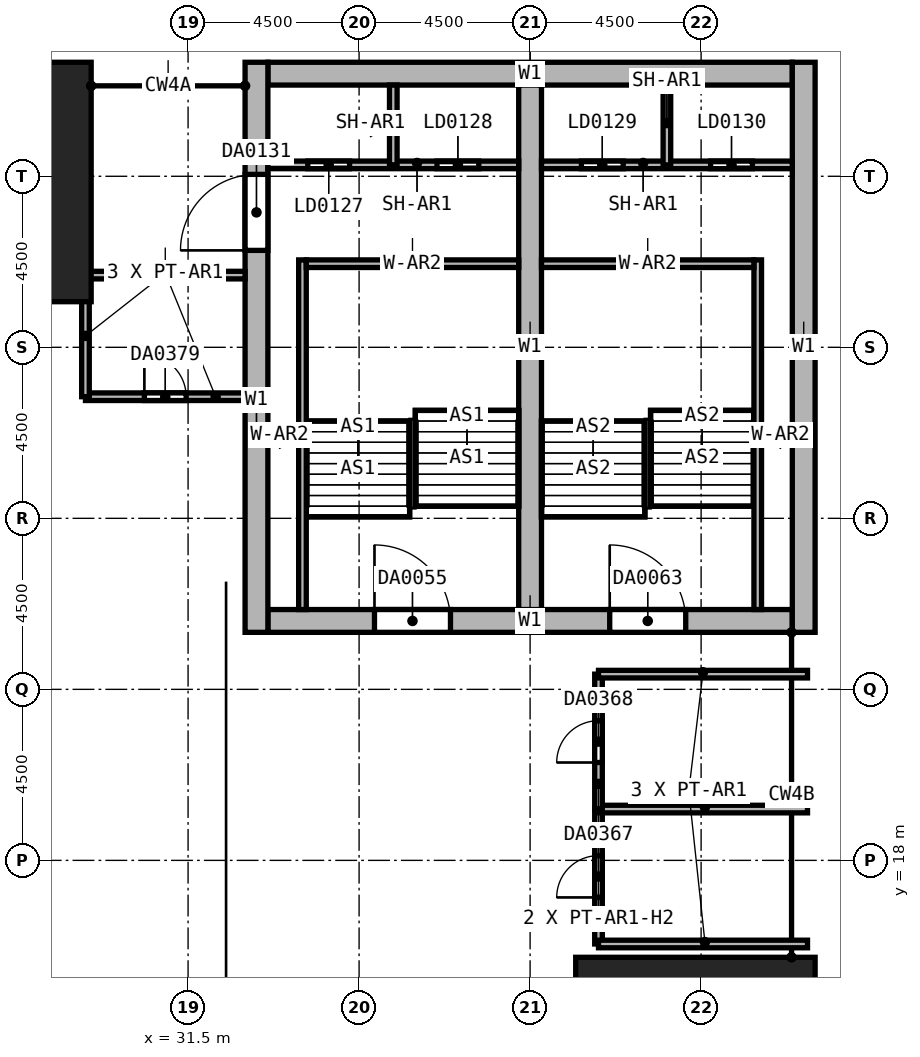
"""IFC4 building model, lengths in metres.
Left out: names, types, materials, properties, quantities, classifications, styles, units other than length and angle.
Written with IfcOpenShell. Run it as: python <this file> out.ifc"""

import sys

from ifc_helpers import new_model, si_unit, direction, frame, frame_2d, origin, origin_2d, place, context, subcontext, project, spatial, rectangle, extrude, element, fill, save


model = new_model("IFC4")
c1 = context("Model", 3, precision=1e-05, world=origin(), true_north=direction((0.0, 1.0)))
c2 = subcontext(c1, "Body", "Model", "MODEL_VIEW")
j1 = project(units=[si_unit("LENGTHUNIT", "METRE"), si_unit("PLANEANGLEUNIT", "RADIAN")], contexts=[c1])
p1 = place(None, origin())
s1 = spatial("IfcSite", under=j1, at=p1, CompositionType="ELEMENT")
p2 = place(p1, origin())
s2 = spatial("IfcBuilding", under=s1, at=p2, CompositionType="ELEMENT")
p3 = place(p2, frame((0.0, 0.0, 19.0)))
s3 = spatial("IfcBuildingStorey", under=s2, at=p3, CompositionType="ELEMENT", Elevation=19.0)
for number, where, z_axis, x_axis in (
    (1, (27.0, 35.85, 0.0), (0.0, 0.0, 1.0), (1.0, 0.0, 0.0)),
    (2, (44.85, 13.5, 0.0), (0.0, 0.0, 1.0), (0.0, 1.0, 0.0)),
):
    element("IfcColumn", number, at=place(p3, frame(where, z_axis=z_axis, x_axis=x_axis)), inside=s3, PredefinedType="COLUMN", context=c2, shape_type="SweptSolid", body=[
        extrude(rectangle(XDim=3.9, YDim=6.3, at=origin_2d()), origin(), (0.0, 0.0, 1.0), 6.0),
    ])
p4 = place(p3, frame((33.6, 38.7, 0.0), z_axis=(0.0, 0.0, 1.0), x_axis=(1.0, 0.0, 0.0)))
e3 = element("IfcWall", 3, at=p4, inside=s3, PredefinedType="SHEAR", context=c2, shape_type="SweptSolid", body=[
    extrude(rectangle(XDim=13.8, YDim=0.6, at=frame_2d((6.9, 0.0))), origin(), (0.0, 0.0, 1.0), 6.0),
])
p5 = place(p3, frame((33.6, 24.3, 0.0), z_axis=(0.0, 0.0, 1.0), x_axis=(1.0, 0.0, 0.0)))
e4 = element("IfcWall", 4, at=p5, inside=s3, PredefinedType="SHEAR", context=c2, shape_type="SweptSolid", body=[
    extrude(rectangle(XDim=13.8, YDim=0.6, at=frame_2d((6.9, 0.0))), origin(), (0.0, 0.0, 1.0), 6.0),
])
p6 = place(p5, frame((2.805, 0.0, 0.0)))
e5 = element("IfcOpeningElement", 5, at=p6, cuts=e4, PredefinedType="OPENING", context=c2, shape_type="SweptSolid", body=[
    extrude(rectangle(XDim=2.0, YDim=2.4, at=frame_2d((1.0, 1.2))), frame((0.0, 0.3, 0.0), z_axis=(0.0, -1.0, 0.0), x_axis=(1.0, 0.0, 0.0)), (0.0, 0.0, 1.0), 0.6),
])
p7 = place(p5, frame((8.995, 0.0, 0.0)))
e6 = element("IfcOpeningElement", 6, at=p7, cuts=e4, PredefinedType="OPENING", context=c2, shape_type="SweptSolid", body=[
    extrude(rectangle(XDim=2.0, YDim=2.4, at=frame_2d((1.0, 1.2))), frame((0.0, 0.3, 0.0), z_axis=(0.0, -1.0, 0.0), x_axis=(1.0, 0.0, 0.0)), (0.0, 0.0, 1.0), 0.6),
])
p8 = place(p3, frame((33.3, 24.0, 0.0), z_axis=(0.0, 0.0, 1.0), x_axis=(0.0, 1.0, 0.0)))
e7 = element("IfcWall", 7, at=p8, inside=s3, PredefinedType="SHEAR", context=c2, shape_type="SweptSolid", body=[
    extrude(rectangle(XDim=15.0, YDim=0.6, at=frame_2d((7.5, 0.0))), origin(), (0.0, 0.0, 1.0), 6.0),
])
p9 = place(p8, frame((10.05, 0.0, 0.0)))
e8 = element("IfcOpeningElement", 8, at=p9, cuts=e7, PredefinedType="OPENING", context=c2, shape_type="SweptSolid", body=[
    extrude(rectangle(XDim=2.0, YDim=2.4, at=frame_2d((1.0, 1.2))), frame((0.0, 0.3, 0.0), z_axis=(0.0, -1.0, 0.0), x_axis=(1.0, 0.0, 0.0)), (0.0, 0.0, 1.0), 0.6),
])
p10 = place(p3, frame((47.7, 24.0, 0.0), z_axis=(0.0, 0.0, 1.0), x_axis=(0.0, 1.0, 0.0)))
e9 = element("IfcWall", 9, at=p10, inside=s3, PredefinedType="SHEAR", context=c2, shape_type="SweptSolid", body=[
    extrude(rectangle(XDim=15.0, YDim=0.6, at=frame_2d((7.5, 0.0))), origin(), (0.0, 0.0, 1.0), 6.0),
])
p11 = place(p3, frame((40.5, 24.6, 0.0), z_axis=(0.0, 0.0, 1.0), x_axis=(0.0, 1.0, 0.0)))
e10 = element("IfcWall", 10, at=p11, inside=s3, PredefinedType="SHEAR", context=c2, shape_type="SweptSolid", body=[
    extrude(rectangle(XDim=13.8, YDim=0.6, at=frame_2d((6.9, 0.0))), origin(), (0.0, 0.0, 1.0), 6.0),
])
p12 = place(p3, frame((34.51, 24.6, 0.0), z_axis=(0.0, 0.0, 1.0), x_axis=(0.0, 1.0, 0.0)))
e11 = element("IfcWall", 11, at=p12, inside=s3, PredefinedType="SOLIDWALL", context=c2, shape_type="SweptSolid", body=[
    extrude(rectangle(XDim=9.2, YDim=0.2, at=frame_2d((4.6, 0.0))), origin(), (0.0, 0.0, 1.0), 6.0),
])
p13 = place(p3, frame((34.61, 33.7, 0.0), z_axis=(0.0, 0.0, 1.0), x_axis=(1.0, 0.0, 0.0)))
e12 = element("IfcWall", 12, at=p13, inside=s3, PredefinedType="SOLIDWALL", context=c2, shape_type="SweptSolid", body=[
    extrude(rectangle(XDim=5.59, YDim=0.2, at=frame_2d((2.795, 0.0))), origin(), (0.0, 0.0, 1.0), 6.0),
])
p14 = place(p3, frame((46.49, 24.6, 0.0), z_axis=(0.0, 0.0, 1.0), x_axis=(0.0, 1.0, 0.0)))
e13 = element("IfcWall", 13, at=p14, inside=s3, PredefinedType="SOLIDWALL", context=c2, shape_type="SweptSolid", body=[
    extrude(rectangle(XDim=9.2, YDim=0.2, at=frame_2d((4.6, 0.0))), origin(), (0.0, 0.0, 1.0), 6.0),
])
p15 = place(p3, frame((40.8, 33.7, 0.0), z_axis=(0.0, 0.0, 1.0), x_axis=(1.0, 0.0, 0.0)))
e14 = element("IfcWall", 14, at=p15, inside=s3, PredefinedType="SOLIDWALL", context=c2, shape_type="SweptSolid", body=[
    extrude(rectangle(XDim=5.59, YDim=0.2, at=frame_2d((2.795, 0.0))), origin(), (0.0, 0.0, 1.0), 6.0),
])
p16 = place(p3, frame((33.6, 36.3, 0.0), z_axis=(0.0, 0.0, 1.0), x_axis=(1.0, 0.0, 0.0)))
e15 = element("IfcWall", 15, at=p16, inside=s3, PredefinedType="SHEAR", context=c2, shape_type="SweptSolid", body=[
    extrude(rectangle(XDim=6.6, YDim=0.2, at=frame_2d((3.3, 0.0))), origin(), (0.0, 0.0, 1.0), 6.0),
])
p17 = place(p16, frame((1.05, 0.0, 0.0)))
e16 = element("IfcOpeningElement", 16, at=p17, cuts=e15, PredefinedType="OPENING", context=c2, shape_type="SweptSolid", body=[
    extrude(rectangle(XDim=1.1, YDim=2.4, at=frame_2d((0.55, 1.2))), frame((0.0, 0.1, 0.0), z_axis=(0.0, -1.0, 0.0), x_axis=(1.0, 0.0, 0.0)), (0.0, 0.0, 1.0), 0.2),
])
p18 = place(p16, frame((4.45, 0.0, 0.0)))
e17 = element("IfcOpeningElement", 17, at=p18, cuts=e15, PredefinedType="OPENING", context=c2, shape_type="SweptSolid", body=[
    extrude(rectangle(XDim=1.1, YDim=2.4, at=frame_2d((0.55, 1.2))), frame((0.0, 0.1, 0.0), z_axis=(0.0, -1.0, 0.0), x_axis=(1.0, 0.0, 0.0)), (0.0, 0.0, 1.0), 0.2),
])
p19 = place(p3, frame((40.8, 36.3, 0.0), z_axis=(0.0, 0.0, 1.0), x_axis=(1.0, 0.0, 0.0)))
e18 = element("IfcWall", 18, at=p19, inside=s3, PredefinedType="SHEAR", context=c2, shape_type="SweptSolid", body=[
    extrude(rectangle(XDim=6.6, YDim=0.2, at=frame_2d((3.3, 0.0))), origin(), (0.0, 0.0, 1.0), 6.0),
])
p20 = place(p19, frame((1.05, 0.0, 0.0)))
e19 = element("IfcOpeningElement", 19, at=p20, cuts=e18, PredefinedType="OPENING", context=c2, shape_type="SweptSolid", body=[
    extrude(rectangle(XDim=1.1, YDim=2.4, at=frame_2d((0.55, 1.2))), frame((0.0, 0.1, 0.0), z_axis=(0.0, -1.0, 0.0), x_axis=(1.0, 0.0, 0.0)), (0.0, 0.0, 1.0), 0.2),
])
p21 = place(p19, frame((4.45, 0.0, 0.0)))
e20 = element("IfcOpeningElement", 20, at=p21, cuts=e18, PredefinedType="OPENING", context=c2, shape_type="SweptSolid", body=[
    extrude(rectangle(XDim=1.1, YDim=2.4, at=frame_2d((0.55, 1.2))), frame((0.0, 0.1, 0.0), z_axis=(0.0, -1.0, 0.0), x_axis=(1.0, 0.0, 0.0)), (0.0, 0.0, 1.0), 0.2),
])
for number, where, z_axis, x_axis in (
    (21, (36.9, 36.3, 0.0), (0.0, 0.0, 1.0), (0.0, 1.0, 0.0)),
    (22, (44.1, 36.3, 0.0), (0.0, 0.0, 1.0), (0.0, 1.0, 0.0)),
):
    element("IfcWall", number, at=place(p3, frame(where, z_axis=z_axis, x_axis=x_axis)), inside=s3, PredefinedType="SHEAR", context=c2, shape_type="SweptSolid", body=[
        extrude(rectangle(XDim=2.1, YDim=0.2, at=frame_2d((1.05, 0.0))), origin(), (0.0, 0.0, 1.0), 6.0),
    ])
p22 = place(p3, frame((42.3, 15.8, 0.0), z_axis=(0.0, 0.0, 1.0), x_axis=(0.0, 1.0, 0.0)))
e23 = element("IfcWall", 23, at=p22, inside=s3, PredefinedType="PARTITIONING", context=c2, shape_type="SweptSolid", body=[
    extrude(rectangle(XDim=3.55, YDim=0.2, at=frame_2d((1.775, 0.0))), origin(), (0.0, 0.0, 1.0), 4.5),
])
p23 = place(p22, frame((1.225, 0.0, 0.0)))
e24 = element("IfcOpeningElement", 24, at=p23, cuts=e23, PredefinedType="OPENING", context=c2, shape_type="SweptSolid", body=[
    extrude(rectangle(XDim=1.1, YDim=2.4, at=frame_2d((0.55, 1.2))), frame((0.0, 0.1, 0.0), z_axis=(0.0, -1.0, 0.0), x_axis=(1.0, 0.0, 0.0)), (0.0, 0.0, 1.0), 0.2),
])
for number, where, z_axis, x_axis in (
    (25, (42.3, 15.8, 0.0), (0.0, 0.0, 1.0), (1.0, 0.0, 0.0)),
    (26, (42.3, 19.35, 0.0), (0.0, 0.0, 1.0), (1.0, 0.0, 0.0)),
):
    element("IfcWall", number, at=place(p3, frame(where, z_axis=z_axis, x_axis=x_axis)), inside=s3, PredefinedType="PARTITIONING", context=c2, shape_type="SweptSolid", body=[
        extrude(rectangle(XDim=5.5, YDim=0.2, at=frame_2d((2.75, 0.0))), origin(), (0.0, 0.0, 1.0), 5.7),
    ])
p24 = place(p3, frame((42.3, 19.35, 0.0), z_axis=(0.0, 0.0, 1.0), x_axis=(0.0, 1.0, 0.0)))
e27 = element("IfcWall", 27, at=p24, inside=s3, PredefinedType="PARTITIONING", context=c2, shape_type="SweptSolid", body=[
    extrude(rectangle(XDim=3.55, YDim=0.2, at=frame_2d((1.775, 0.0))), origin(), (0.0, 0.0, 1.0), 4.5),
])
p25 = place(p24, frame((1.225, 0.0, 0.0)))
e28 = element("IfcOpeningElement", 28, at=p25, cuts=e27, PredefinedType="OPENING", context=c2, shape_type="SweptSolid", body=[
    extrude(rectangle(XDim=1.1, YDim=2.4, at=frame_2d((0.55, 1.2))), frame((0.0, 0.1, 0.0), z_axis=(0.0, -1.0, 0.0), x_axis=(1.0, 0.0, 0.0)), (0.0, 0.0, 1.0), 0.2),
])
p26 = place(p3, frame((42.3, 22.9, 0.0), z_axis=(0.0, 0.0, 1.0), x_axis=(1.0, 0.0, 0.0)))
e29 = element("IfcWall", 29, at=p26, inside=s3, PredefinedType="PARTITIONING", context=c2, shape_type="SweptSolid", body=[
    extrude(rectangle(XDim=5.5, YDim=0.2, at=frame_2d((2.75, 0.0))), origin(), (0.0, 0.0, 1.0), 5.7),
])
p27 = place(p3, frame((28.8, 30.2, 0.0), z_axis=(0.0, 0.0, 1.0), x_axis=(1.0, 0.0, 0.0)))
e30 = element("IfcWall", 30, at=p27, inside=s3, PredefinedType="PARTITIONING", context=c2, shape_type="SweptSolid", body=[
    extrude(rectangle(XDim=4.2, YDim=0.2, at=frame_2d((2.1, 0.0))), origin(), (0.0, 0.0, 1.0), 5.7),
])
p28 = place(p27, frame((1.55, 0.0, 0.0)))
e31 = element("IfcOpeningElement", 31, at=p28, cuts=e30, PredefinedType="OPENING", context=c2, shape_type="SweptSolid", body=[
    extrude(rectangle(XDim=1.1, YDim=2.4, at=frame_2d((0.55, 1.2))), frame((0.0, 0.1, 0.0), z_axis=(0.0, -1.0, 0.0), x_axis=(1.0, 0.0, 0.0)), (0.0, 0.0, 1.0), 0.2),
])
p29 = place(p3, frame((28.8, 30.2, 0.0), z_axis=(0.0, 0.0, 1.0), x_axis=(0.0, 1.0, 0.0)))
e32 = element("IfcWall", 32, at=p29, inside=s3, PredefinedType="PARTITIONING", context=c2, shape_type="SweptSolid", body=[
    extrude(rectangle(XDim=3.2, YDim=0.2, at=frame_2d((1.6, 0.0))), origin(), (0.0, 0.0, 1.0), 5.7),
])
p30 = place(p3, frame((28.8, 33.4, 0.0), z_axis=(0.0, 0.0, 1.0), x_axis=(1.0, 0.0, 0.0)))
e33 = element("IfcWall", 33, at=p30, inside=s3, PredefinedType="PARTITIONING", context=c2, shape_type="SweptSolid", body=[
    extrude(rectangle(XDim=4.2, YDim=0.2, at=frame_2d((2.1, 0.0))), origin(), (0.0, 0.0, 1.0), 5.7),
])
p31 = place(p6, origin())
e34 = element("IfcDoor", 34, at=p31, inside=s3, OperationType="DOUBLE_DOOR_SINGLE_SWING", PredefinedType="DOOR", context=c2, shape_type="SweptSolid", body=[
    extrude(rectangle(XDim=2.0, YDim=2.4, at=frame_2d((1.0, 1.2))), frame((0.0, 0.025, 0.0), z_axis=(0.0, -1.0, 0.0), x_axis=(1.0, 0.0, 0.0)), (0.0, 0.0, 1.0), 0.05),
])
fill(e5, e34)
p32 = place(p7, origin())
e35 = element("IfcDoor", 35, at=p32, inside=s3, OperationType="DOUBLE_DOOR_SINGLE_SWING", PredefinedType="DOOR", context=c2, shape_type="SweptSolid", body=[
    extrude(rectangle(XDim=2.0, YDim=2.4, at=frame_2d((1.0, 1.2))), frame((0.0, 0.025, 0.0), z_axis=(0.0, -1.0, 0.0), x_axis=(1.0, 0.0, 0.0)), (0.0, 0.0, 1.0), 0.05),
])
fill(e6, e35)
p33 = place(p17, origin())
e36 = element("IfcDoor", 36, at=p33, inside=s3, OperationType="DOUBLE_DOOR_SLIDING", PredefinedType="DOOR", context=c2, shape_type="SweptSolid", body=[
    extrude(rectangle(XDim=1.1, YDim=2.4, at=frame_2d((0.55, 1.2))), frame((0.0, 0.025, 0.0), z_axis=(0.0, -1.0, 0.0), x_axis=(1.0, 0.0, 0.0)), (0.0, 0.0, 1.0), 0.05),
])
fill(e16, e36)
p34 = place(p18, origin())
e37 = element("IfcDoor", 37, at=p34, inside=s3, OperationType="DOUBLE_DOOR_SLIDING", PredefinedType="DOOR", context=c2, shape_type="SweptSolid", body=[
    extrude(rectangle(XDim=1.1, YDim=2.4, at=frame_2d((0.55, 1.2))), frame((0.0, 0.025, 0.0), z_axis=(0.0, -1.0, 0.0), x_axis=(1.0, 0.0, 0.0)), (0.0, 0.0, 1.0), 0.05),
])
fill(e17, e37)
p35 = place(p20, origin())
e38 = element("IfcDoor", 38, at=p35, inside=s3, OperationType="DOUBLE_DOOR_SLIDING", PredefinedType="DOOR", context=c2, shape_type="SweptSolid", body=[
    extrude(rectangle(XDim=1.1, YDim=2.4, at=frame_2d((0.55, 1.2))), frame((0.0, 0.025, 0.0), z_axis=(0.0, -1.0, 0.0), x_axis=(1.0, 0.0, 0.0)), (0.0, 0.0, 1.0), 0.05),
])
fill(e19, e38)
p36 = place(p21, origin())
e39 = element("IfcDoor", 39, at=p36, inside=s3, OperationType="DOUBLE_DOOR_SLIDING", PredefinedType="DOOR", context=c2, shape_type="SweptSolid", body=[
    extrude(rectangle(XDim=1.1, YDim=2.4, at=frame_2d((0.55, 1.2))), frame((0.0, 0.025, 0.0), z_axis=(0.0, -1.0, 0.0), x_axis=(1.0, 0.0, 0.0)), (0.0, 0.0, 1.0), 0.05),
])
fill(e20, e39)
p37 = place(p9, origin())
e40 = element("IfcDoor", 40, at=p37, inside=s3, OperationType="DOUBLE_DOOR_SINGLE_SWING", PredefinedType="DOOR", context=c2, shape_type="SweptSolid", body=[
    extrude(rectangle(XDim=2.0, YDim=2.4, at=frame_2d((1.0, 1.2))), frame((0.0, 0.025, 0.0), z_axis=(0.0, -1.0, 0.0), x_axis=(1.0, 0.0, 0.0)), (0.0, 0.0, 1.0), 0.05),
])
fill(e8, e40)
p38 = place(p23, origin())
e41 = element("IfcDoor", 41, at=p38, inside=s3, OperationType="DOUBLE_DOOR_SINGLE_SWING", PredefinedType="DOOR", context=c2, shape_type="SweptSolid", body=[
    extrude(rectangle(XDim=1.1, YDim=2.4, at=frame_2d((0.55, 1.2))), frame((0.0, 0.025, 0.0), z_axis=(0.0, -1.0, 0.0), x_axis=(1.0, 0.0, 0.0)), (0.0, 0.0, 1.0), 0.05),
])
fill(e24, e41)
p39 = place(p25, origin())
e42 = element("IfcDoor", 42, at=p39, inside=s3, OperationType="DOUBLE_DOOR_SINGLE_SWING", PredefinedType="DOOR", context=c2, shape_type="SweptSolid", body=[
    extrude(rectangle(XDim=1.1, YDim=2.4, at=frame_2d((0.55, 1.2))), frame((0.0, 0.025, 0.0), z_axis=(0.0, -1.0, 0.0), x_axis=(1.0, 0.0, 0.0)), (0.0, 0.0, 1.0), 0.05),
])
fill(e28, e42)
p40 = place(p28, origin())
e43 = element("IfcDoor", 43, at=p40, inside=s3, OperationType="DOUBLE_DOOR_SINGLE_SWING", PredefinedType="DOOR", context=c2, shape_type="SweptSolid", body=[
    extrude(rectangle(XDim=1.1, YDim=2.4, at=frame_2d((0.55, 1.2))), frame((0.0, 0.025, 0.0), z_axis=(0.0, -1.0, 0.0), x_axis=(1.0, 0.0, 0.0)), (0.0, 0.0, 1.0), 0.05),
])
fill(e31, e43)
save(model, sys.argv[1])
